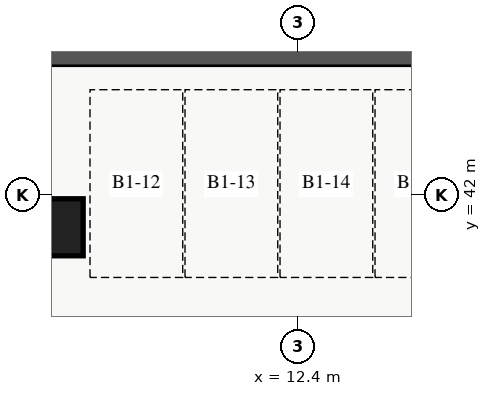
"""IFC4 building model, lengths in metres.
Left out: names, types, materials, properties, quantities, classifications, styles, units other than length and angle.
Written with IfcOpenShell. Run it as: python <this file> out.ifc"""

import sys

from ifc_helpers import new_model, si_unit, direction, frame, frame_2d, origin, origin_2d, place, context, subcontext, project, spatial, rectangle, extrude, source, transform, mapped, element, save


model = new_model("IFC4")
c1 = context("Model", 3, precision=1e-05, world=origin(), true_north=direction((0.0, 1.0)))
c2 = subcontext(c1, "Body", "Model", "MODEL_VIEW")
j1 = project(units=[si_unit("LENGTHUNIT", "METRE"), si_unit("PLANEANGLEUNIT", "RADIAN")], contexts=[c1])
p1 = place(None, origin())
s1 = spatial("IfcSite", under=j1, at=p1, CompositionType="ELEMENT")
p2 = place(p1, origin())
s2 = spatial("IfcBuilding", under=s1, at=p2, CompositionType="ELEMENT")
p3 = place(p2, frame((0.0, 0.0, -4.8)))
s3 = spatial("IfcBuildingStorey", under=s2, at=p3, CompositionType="ELEMENT", Elevation=-4.8)
p4 = place(p3, frame((0.0, 45.7, 0.0), z_axis=(0.0, 0.0, 1.0), x_axis=(1.0, 0.0, 0.0)))
e1 = element("IfcWall", 1, at=p4, inside=s3, PredefinedType="SOLIDWALL", context=c2, shape_type="SweptSolid", body=[
    extrude(rectangle(XDim=74.0, YDim=0.6, at=frame_2d((37.0, 0.0))), origin(), (0.0, 0.0, 1.0), 4.8),
])
m1 = source(origin(), c2, "Body", "SweptSolid", [
    extrude(rectangle(XDim=1.5, YDim=1.5, at=origin_2d()), origin(), (0.0, 0.0, 1.0), 4.8),
])
p5 = place(p3, frame((6.0, 41.15, 0.0), z_axis=(0.0, 0.0, 1.0), x_axis=(1.0, 0.0, 0.0)))
e2 = element("IfcColumn", 2, at=p5, inside=s3, PredefinedType="COLUMN", context=c2, shape_type="MappedRepresentation", body=[
    mapped(m1, transform((0.0, 0.0, 0.0), x_axis=(1.0, 0.0, 0.0), y_axis=(0.0, 1.0, 0.0), z_axis=(0.0, 0.0, 1.0), scale=1.0)),
])
save(model, sys.argv[1])
